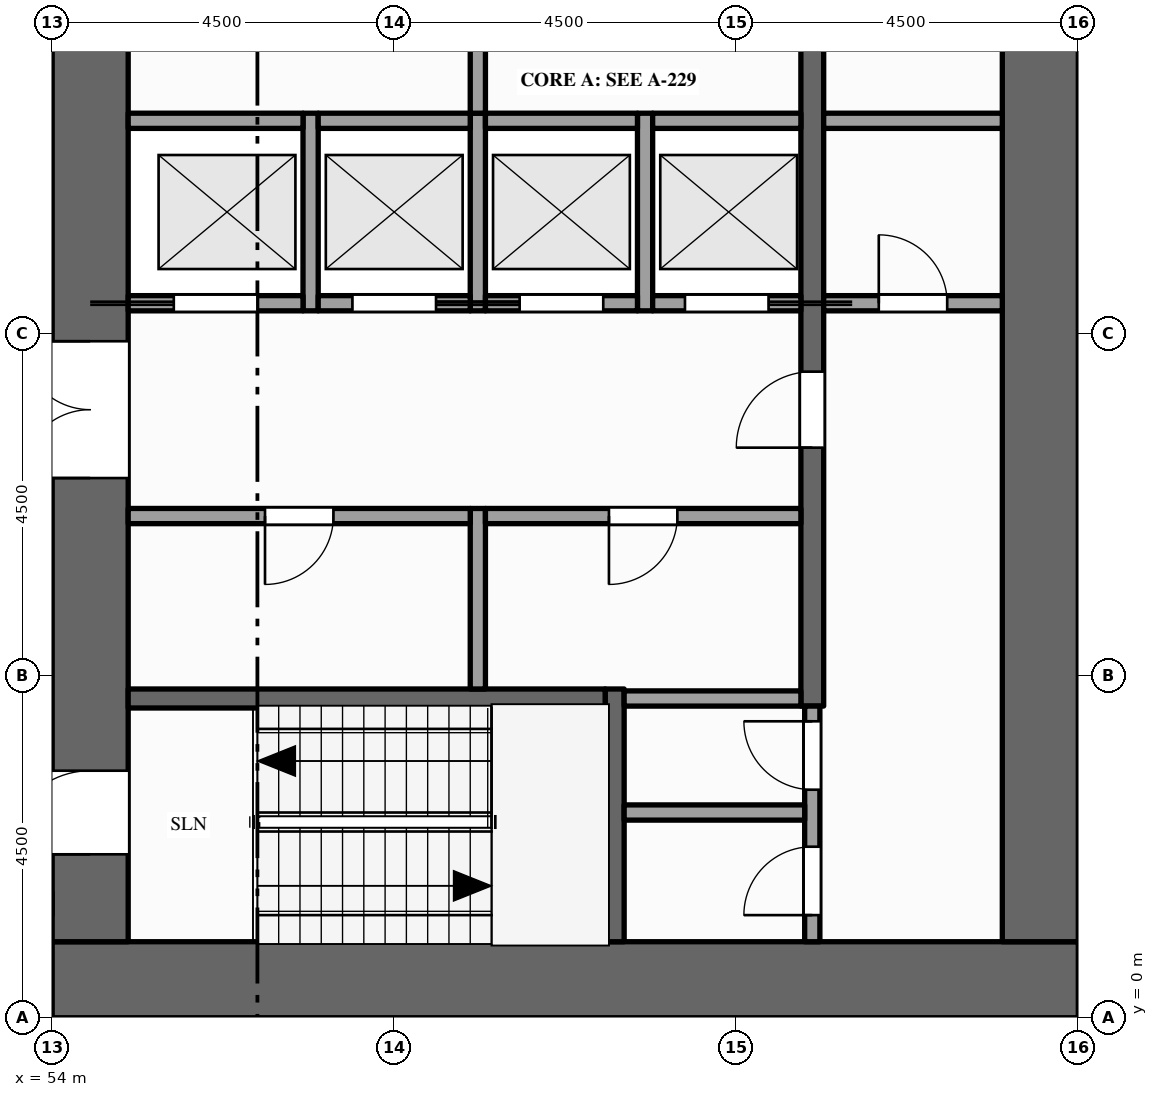
"""IFC4 building model, lengths in metres.
Left out: names, types, materials, properties, quantities, classifications, styles, units other than length and angle.
Written with IfcOpenShell. Run it as: python <this file> out.ifc"""

import sys

from ifc_helpers import new_model, si_unit, direction, frame, frame_2d, origin, place, context, subcontext, project, spatial, rectangle, extrude, element, fill, save


model = new_model("IFC4")
c1 = context("Model", 3, precision=1e-05, world=origin(), true_north=direction((0.0, 1.0)))
c2 = subcontext(c1, "Body", "Model", "MODEL_VIEW")
j1 = project(units=[si_unit("LENGTHUNIT", "METRE"), si_unit("PLANEANGLEUNIT", "RADIAN")], contexts=[c1])
p1 = place(None, origin())
s1 = spatial("IfcSite", under=j1, at=p1, CompositionType="ELEMENT")
p2 = place(p1, origin())
s2 = spatial("IfcBuilding", under=s1, at=p2, CompositionType="ELEMENT")
p3 = place(p2, frame((0.0, 0.0, 155.0)))
s3 = spatial("IfcBuildingStorey", under=s2, at=p3, CompositionType="ELEMENT", Elevation=155.0)
p4 = place(p3, frame((67.5, 0.5, -0.15), z_axis=(0.0, 0.0, 1.0), x_axis=(-1.0, 0.0, 0.0)))
e1 = element("IfcWall", 1, at=p4, inside=s3, PredefinedType="SHEAR", context=c2, shape_type="SweptSolid", body=[
    extrude(rectangle(XDim=13.5, YDim=1.0, at=frame_2d((6.75, 0.0))), origin(), (0.0, 0.0, 1.0), 4.0),
])
p5 = place(p3, frame((54.5, 1.0, -0.15), z_axis=(0.0, 0.0, 1.0), x_axis=(0.0, 1.0, 0.0)))
e2 = element("IfcWall", 2, at=p5, inside=s3, PredefinedType="SHEAR", context=c2, shape_type="SweptSolid", body=[
    extrude(rectangle(XDim=20.5, YDim=1.0, at=frame_2d((10.25, 0.0))), origin(), (0.0, 0.0, 1.0), 4.0),
])
p6 = place(p5, frame((6.1, 0.0, 0.15)))
e3 = element("IfcOpeningElement", 3, at=p6, cuts=e2, PredefinedType="OPENING", context=c2, shape_type="SweptSolid", body=[
    extrude(rectangle(XDim=1.8, YDim=2.1, at=frame_2d((0.9, 1.05))), frame((0.0, 0.51, 0.0), z_axis=(0.0, -1.0, 0.0), x_axis=(1.0, 0.0, 0.0)), (0.0, 0.0, 1.0), 1.02),
])
p7 = place(p5, frame((12.15, 0.0, 0.15)))
e4 = element("IfcOpeningElement", 4, at=p7, cuts=e2, PredefinedType="OPENING", context=c2, shape_type="SweptSolid", body=[
    extrude(rectangle(XDim=1.1, YDim=2.1, at=frame_2d((0.55, 1.05))), frame((0.0, 0.51, 0.0), z_axis=(0.0, -1.0, 0.0), x_axis=(1.0, 0.0, 0.0)), (0.0, 0.0, 1.0), 1.02),
])
p8 = place(p5, frame((1.15, 0.0, 0.15)))
e5 = element("IfcOpeningElement", 5, at=p8, cuts=e2, PredefinedType="OPENING", context=c2, shape_type="SweptSolid", body=[
    extrude(rectangle(XDim=1.1, YDim=2.1, at=frame_2d((0.55, 1.05))), frame((0.0, 0.51, 0.0), z_axis=(0.0, -1.0, 0.0), x_axis=(1.0, 0.0, 0.0)), (0.0, 0.0, 1.0), 1.02),
])
p9 = place(p5, frame((18.35, 0.0, 0.15)))
e6 = element("IfcOpeningElement", 6, at=p9, cuts=e2, PredefinedType="OPENING", context=c2, shape_type="SweptSolid", body=[
    extrude(rectangle(XDim=1.1, YDim=2.1, at=frame_2d((0.55, 1.05))), frame((0.0, 0.51, 0.0), z_axis=(0.0, -1.0, 0.0), x_axis=(1.0, 0.0, 0.0)), (0.0, 0.0, 1.0), 1.02),
])
p10 = place(p3, frame((67.0, 1.0, -0.15), z_axis=(0.0, 0.0, 1.0), x_axis=(0.0, 1.0, 0.0)))
e7 = element("IfcWall", 7, at=p10, inside=s3, PredefinedType="SHEAR", context=c2, shape_type="SweptSolid", body=[
    extrude(rectangle(XDim=20.5, YDim=1.0, at=frame_2d((10.25, 0.0))), origin(), (0.0, 0.0, 1.0), 4.0),
])
p11 = place(p3, frame((57.4, 9.3, 0.0), z_axis=(0.0, 0.0, 1.0), x_axis=(0.0, 1.0, 0.0)))
e8 = element("IfcWall", 8, at=p11, inside=s3, PredefinedType="SOLIDWALL", context=c2, shape_type="SweptSolid", body=[
    extrude(rectangle(XDim=2.6, YDim=0.2, at=frame_2d((1.3, 0.0))), origin(), (0.0, 0.0, 1.0), 3.85),
])
p12 = place(p3, frame((59.6, 4.325, 0.0), z_axis=(0.0, 0.0, 1.0), x_axis=(0.0, 1.0, 0.0)))
e9 = element("IfcWall", 9, at=p12, inside=s3, PredefinedType="PARTITIONING", context=c2, shape_type="SweptSolid", body=[
    extrude(rectangle(XDim=2.375, YDim=0.2, at=frame_2d((1.188, 0.0))), origin(), (0.0, 0.0, 1.0), 3.85),
])
p13 = place(p3, frame((59.6, 9.3, 0.0), z_axis=(0.0, 0.0, 1.0), x_axis=(0.0, 1.0, 0.0)))
e10 = element("IfcWall", 10, at=p13, inside=s3, PredefinedType="SOLIDWALL", context=c2, shape_type="SweptSolid", body=[
    extrude(rectangle(XDim=2.6, YDim=0.2, at=frame_2d((1.3, 0.0))), origin(), (0.0, 0.0, 1.0), 3.85),
])
p14 = place(p3, frame((59.6, 11.9, 0.0), z_axis=(0.0, 0.0, 1.0), x_axis=(0.0, 1.0, 0.0)))
e11 = element("IfcWall", 11, at=p14, inside=s3, PredefinedType="PARTITIONING", context=c2, shape_type="SweptSolid", body=[
    extrude(rectangle(XDim=3.6, YDim=0.2, at=frame_2d((1.8, 0.0))), origin(), (0.0, 0.0, 1.0), 3.85),
])
p15 = place(p14, frame((1.3, 0.0, 0.0)))
e12 = element("IfcOpeningElement", 12, at=p15, cuts=e11, PredefinedType="OPENING", context=c2, shape_type="SweptSolid", body=[
    extrude(rectangle(XDim=1.0, YDim=2.1, at=frame_2d((0.5, 1.05))), frame((0.0, 0.11, 0.0), z_axis=(0.0, -1.0, 0.0), x_axis=(1.0, 0.0, 0.0)), (0.0, 0.0, 1.0), 0.22),
])
p16 = place(p3, frame((61.4, 1.0, 0.0), z_axis=(0.0, 0.0, 1.0), x_axis=(0.0, 1.0, 0.0)))
e13 = element("IfcWall", 13, at=p16, inside=s3, PredefinedType="SHEAR", context=c2, shape_type="SweptSolid", body=[
    extrude(rectangle(XDim=3.325, YDim=0.25, at=frame_2d((1.663, 0.0))), origin(), (0.0, 0.0, 1.0), 3.85),
])
p17 = place(p3, frame((61.8, 9.3, 0.0), z_axis=(0.0, 0.0, 1.0), x_axis=(0.0, 1.0, 0.0)))
e14 = element("IfcWall", 14, at=p17, inside=s3, PredefinedType="SOLIDWALL", context=c2, shape_type="SweptSolid", body=[
    extrude(rectangle(XDim=2.6, YDim=0.2, at=frame_2d((1.3, 0.0))), origin(), (0.0, 0.0, 1.0), 3.85),
])
p18 = place(p3, frame((64.0, 1.0, 0.0), z_axis=(0.0, 0.0, 1.0), x_axis=(0.0, 1.0, 0.0)))
e15 = element("IfcWall", 15, at=p18, inside=s3, PredefinedType="PARTITIONING", context=c2, shape_type="SweptSolid", body=[
    extrude(rectangle(XDim=3.1, YDim=0.2, at=frame_2d((1.55, 0.0))), origin(), (0.0, 0.0, 1.0), 3.85),
])
p19 = place(p18, frame((0.35, 0.0, 0.0)))
e16 = element("IfcOpeningElement", 16, at=p19, cuts=e15, PredefinedType="OPENING", context=c2, shape_type="SweptSolid", body=[
    extrude(rectangle(XDim=0.9, YDim=2.1, at=frame_2d((0.45, 1.05))), frame((0.0, 0.11, 0.0), z_axis=(0.0, -1.0, 0.0), x_axis=(1.0, 0.0, 0.0)), (0.0, 0.0, 1.0), 0.22),
])
p20 = place(p18, frame((2.0, 0.0, 0.0)))
e17 = element("IfcOpeningElement", 17, at=p20, cuts=e15, PredefinedType="OPENING", context=c2, shape_type="SweptSolid", body=[
    extrude(rectangle(XDim=0.9, YDim=2.1, at=frame_2d((0.45, 1.05))), frame((0.0, 0.11, 0.0), z_axis=(0.0, -1.0, 0.0), x_axis=(1.0, 0.0, 0.0)), (0.0, 0.0, 1.0), 0.22),
])
p21 = place(p3, frame((64.0, 4.1, 0.0), z_axis=(0.0, 0.0, 1.0), x_axis=(0.0, 1.0, 0.0)))
e18 = element("IfcWall", 18, at=p21, inside=s3, PredefinedType="SHEAR", context=c2, shape_type="SweptSolid", body=[
    extrude(rectangle(XDim=14.5, YDim=0.3, at=frame_2d((7.25, 0.0))), origin(), (0.0, 0.0, 1.0), 3.85),
])
p22 = place(p21, frame((3.4, 0.0, 0.0)))
e19 = element("IfcOpeningElement", 19, at=p22, cuts=e18, PredefinedType="OPENING", context=c2, shape_type="SweptSolid", body=[
    extrude(rectangle(XDim=1.0, YDim=2.1, at=frame_2d((0.5, 1.05))), frame((0.0, 0.16, 0.0), z_axis=(0.0, -1.0, 0.0), x_axis=(1.0, 0.0, 0.0)), (0.0, 0.0, 1.0), 0.32),
])
p23 = place(p21, frame((9.1, 0.0, 0.0)))
e20 = element("IfcOpeningElement", 20, at=p23, cuts=e18, PredefinedType="OPENING", context=c2, shape_type="SweptSolid", body=[
    extrude(rectangle(XDim=1.0, YDim=2.1, at=frame_2d((0.5, 1.05))), frame((0.0, 0.16, 0.0), z_axis=(0.0, -1.0, 0.0), x_axis=(1.0, 0.0, 0.0)), (0.0, 0.0, 1.0), 0.32),
])
p24 = place(p3, frame((61.525, 2.7, 0.0), z_axis=(0.0, 0.0, 1.0), x_axis=(1.0, 0.0, 0.0)))
e21 = element("IfcWall", 21, at=p24, inside=s3, PredefinedType="PARTITIONING", context=c2, shape_type="SweptSolid", body=[
    extrude(rectangle(XDim=2.375, YDim=0.2, at=frame_2d((1.188, 0.0))), origin(), (0.0, 0.0, 1.0), 3.85),
])
p25 = place(p3, frame((55.0, 4.2, 0.0), z_axis=(0.0, 0.0, 1.0), x_axis=(1.0, 0.0, 0.0)))
e22 = element("IfcWall", 22, at=p25, inside=s3, PredefinedType="SHEAR", context=c2, shape_type="SweptSolid", body=[
    extrude(rectangle(XDim=6.275, YDim=0.25, at=frame_2d((3.137, 0.0))), origin(), (0.0, 0.0, 1.0), 3.85),
])
p26 = place(p3, frame((61.525, 4.2, 0.0), z_axis=(0.0, 0.0, 1.0), x_axis=(1.0, 0.0, 0.0)))
e23 = element("IfcWall", 23, at=p26, inside=s3, PredefinedType="PARTITIONING", context=c2, shape_type="SweptSolid", body=[
    extrude(rectangle(XDim=2.325, YDim=0.2, at=frame_2d((1.163, 0.0))), origin(), (0.0, 0.0, 1.0), 3.85),
])
p27 = place(p3, frame((55.0, 6.6, 0.0), z_axis=(0.0, 0.0, 1.0), x_axis=(1.0, 0.0, 0.0)))
e24 = element("IfcWall", 24, at=p27, inside=s3, PredefinedType="PARTITIONING", context=c2, shape_type="SweptSolid", body=[
    extrude(rectangle(XDim=4.5, YDim=0.2, at=frame_2d((2.25, 0.0))), origin(), (0.0, 0.0, 1.0), 3.85),
])
p28 = place(p27, frame((1.8, 0.0, 0.0)))
e25 = element("IfcOpeningElement", 25, at=p28, cuts=e24, PredefinedType="OPENING", context=c2, shape_type="SweptSolid", body=[
    extrude(rectangle(XDim=0.9, YDim=2.1, at=frame_2d((0.45, 1.05))), frame((0.0, 0.11, 0.0), z_axis=(0.0, -1.0, 0.0), x_axis=(1.0, 0.0, 0.0)), (0.0, 0.0, 1.0), 0.22),
])
p29 = place(p3, frame((59.7, 6.6, 0.0), z_axis=(0.0, 0.0, 1.0), x_axis=(1.0, 0.0, 0.0)))
e26 = element("IfcWall", 26, at=p29, inside=s3, PredefinedType="PARTITIONING", context=c2, shape_type="SweptSolid", body=[
    extrude(rectangle(XDim=4.15, YDim=0.2, at=frame_2d((2.075, 0.0))), origin(), (0.0, 0.0, 1.0), 3.85),
])
p30 = place(p29, frame((1.625, 0.0, 0.0)))
e27 = element("IfcOpeningElement", 27, at=p30, cuts=e26, PredefinedType="OPENING", context=c2, shape_type="SweptSolid", body=[
    extrude(rectangle(XDim=0.9, YDim=2.1, at=frame_2d((0.45, 1.05))), frame((0.0, 0.11, 0.0), z_axis=(0.0, -1.0, 0.0), x_axis=(1.0, 0.0, 0.0)), (0.0, 0.0, 1.0), 0.22),
])
p31 = place(p3, frame((55.0, 9.4, 0.0), z_axis=(0.0, 0.0, 1.0), x_axis=(1.0, 0.0, 0.0)))
e28 = element("IfcWall", 28, at=p31, inside=s3, PredefinedType="SOLIDWALL", context=c2, shape_type="SweptSolid", body=[
    extrude(rectangle(XDim=2.3, YDim=0.2, at=frame_2d((1.15, 0.0))), origin(), (0.0, 0.0, 1.0), 3.85),
])
p32 = place(p31, frame((0.6, 0.0, 0.012)))
e29 = element("IfcOpeningElement", 29, at=p32, cuts=e28, PredefinedType="OPENING", context=c2, shape_type="SweptSolid", body=[
    extrude(rectangle(XDim=1.1, YDim=2.1, at=frame_2d((0.55, 1.05))), frame((0.0, 0.11, 0.0), z_axis=(0.0, -1.0, 0.0), x_axis=(1.0, 0.0, 0.0)), (0.0, 0.0, 1.0), 0.22),
])
p33 = place(p3, frame((57.5, 9.4, 0.0), z_axis=(0.0, 0.0, 1.0), x_axis=(1.0, 0.0, 0.0)))
e30 = element("IfcWall", 30, at=p33, inside=s3, PredefinedType="SOLIDWALL", context=c2, shape_type="SweptSolid", body=[
    extrude(rectangle(XDim=2.0, YDim=0.2, at=frame_2d((1.0, 0.0))), origin(), (0.0, 0.0, 1.0), 3.85),
])
p34 = place(p33, frame((0.45, 0.0, 0.012)))
e31 = element("IfcOpeningElement", 31, at=p34, cuts=e30, PredefinedType="OPENING", context=c2, shape_type="SweptSolid", body=[
    extrude(rectangle(XDim=1.1, YDim=2.1, at=frame_2d((0.55, 1.05))), frame((0.0, 0.11, 0.0), z_axis=(0.0, -1.0, 0.0), x_axis=(1.0, 0.0, 0.0)), (0.0, 0.0, 1.0), 0.22),
])
p35 = place(p3, frame((59.7, 9.4, 0.0), z_axis=(0.0, 0.0, 1.0), x_axis=(1.0, 0.0, 0.0)))
e32 = element("IfcWall", 32, at=p35, inside=s3, PredefinedType="SOLIDWALL", context=c2, shape_type="SweptSolid", body=[
    extrude(rectangle(XDim=2.0, YDim=0.2, at=frame_2d((1.0, 0.0))), origin(), (0.0, 0.0, 1.0), 3.85),
])
p36 = place(p35, frame((0.45, 0.0, 0.012)))
e33 = element("IfcOpeningElement", 33, at=p36, cuts=e32, PredefinedType="OPENING", context=c2, shape_type="SweptSolid", body=[
    extrude(rectangle(XDim=1.1, YDim=2.1, at=frame_2d((0.55, 1.05))), frame((0.0, 0.11, 0.0), z_axis=(0.0, -1.0, 0.0), x_axis=(1.0, 0.0, 0.0)), (0.0, 0.0, 1.0), 0.22),
])
p37 = place(p3, frame((61.9, 9.4, 0.0), z_axis=(0.0, 0.0, 1.0), x_axis=(1.0, 0.0, 0.0)))
e34 = element("IfcWall", 34, at=p37, inside=s3, PredefinedType="SOLIDWALL", context=c2, shape_type="SweptSolid", body=[
    extrude(rectangle(XDim=1.95, YDim=0.2, at=frame_2d((0.975, 0.0))), origin(), (0.0, 0.0, 1.0), 3.85),
])
p38 = place(p37, frame((0.425, 0.0, 0.012)))
e35 = element("IfcOpeningElement", 35, at=p38, cuts=e34, PredefinedType="OPENING", context=c2, shape_type="SweptSolid", body=[
    extrude(rectangle(XDim=1.1, YDim=2.1, at=frame_2d((0.55, 1.05))), frame((0.0, 0.11, 0.0), z_axis=(0.0, -1.0, 0.0), x_axis=(1.0, 0.0, 0.0)), (0.0, 0.0, 1.0), 0.22),
])
p39 = place(p3, frame((64.15, 9.4, 0.0), z_axis=(0.0, 0.0, 1.0), x_axis=(1.0, 0.0, 0.0)))
e36 = element("IfcWall", 36, at=p39, inside=s3, PredefinedType="PARTITIONING", context=c2, shape_type="SweptSolid", body=[
    extrude(rectangle(XDim=2.35, YDim=0.2, at=frame_2d((1.175, 0.0))), origin(), (0.0, 0.0, 1.0), 3.85),
])
p40 = place(p39, frame((0.725, 0.0, 0.0)))
e37 = element("IfcOpeningElement", 37, at=p40, cuts=e36, PredefinedType="OPENING", context=c2, shape_type="SweptSolid", body=[
    extrude(rectangle(XDim=0.9, YDim=2.1, at=frame_2d((0.45, 1.05))), frame((0.0, 0.11, 0.0), z_axis=(0.0, -1.0, 0.0), x_axis=(1.0, 0.0, 0.0)), (0.0, 0.0, 1.0), 0.22),
])
p41 = place(p3, frame((55.0, 11.8, 0.0), z_axis=(0.0, 0.0, 1.0), x_axis=(1.0, 0.0, 0.0)))
e38 = element("IfcWall", 38, at=p41, inside=s3, PredefinedType="SOLIDWALL", context=c2, shape_type="SweptSolid", body=[
    extrude(rectangle(XDim=2.3, YDim=0.2, at=frame_2d((1.15, 0.0))), origin(), (0.0, 0.0, 1.0), 3.85),
])
for number, where, z_axis, x_axis in (
    (39, (57.5, 11.8, 0.0), (0.0, 0.0, 1.0), (1.0, 0.0, 0.0)),
    (40, (59.7, 11.8, 0.0), (0.0, 0.0, 1.0), (1.0, 0.0, 0.0)),
):
    element("IfcWall", number, at=place(p3, frame(where, z_axis=z_axis, x_axis=x_axis)), inside=s3, PredefinedType="SOLIDWALL", context=c2, shape_type="SweptSolid", body=[
        extrude(rectangle(XDim=2.0, YDim=0.2, at=frame_2d((1.0, 0.0))), origin(), (0.0, 0.0, 1.0), 3.85),
    ])
p42 = place(p3, frame((61.9, 11.8, 0.0), z_axis=(0.0, 0.0, 1.0), x_axis=(1.0, 0.0, 0.0)))
e41 = element("IfcWall", 41, at=p42, inside=s3, PredefinedType="SOLIDWALL", context=c2, shape_type="SweptSolid", body=[
    extrude(rectangle(XDim=1.95, YDim=0.2, at=frame_2d((0.975, 0.0))), origin(), (0.0, 0.0, 1.0), 3.85),
])
p43 = place(p3, frame((64.15, 11.8, 0.0), z_axis=(0.0, 0.0, 1.0), x_axis=(1.0, 0.0, 0.0)))
e42 = element("IfcWall", 42, at=p43, inside=s3, PredefinedType="PARTITIONING", context=c2, shape_type="SweptSolid", body=[
    extrude(rectangle(XDim=2.35, YDim=0.2, at=frame_2d((1.175, 0.0))), origin(), (0.0, 0.0, 1.0), 3.85),
])
p44 = place(p32, origin())
e43 = element("IfcDoor", 43, at=p44, inside=s3, OperationType="SLIDING_TO_LEFT", PredefinedType="DOOR", context=c2, shape_type="SweptSolid", body=[
    extrude(rectangle(XDim=1.1, YDim=2.1, at=frame_2d((0.55, 1.05))), frame((0.0, 0.025, 0.0), z_axis=(0.0, -1.0, 0.0), x_axis=(1.0, 0.0, 0.0)), (0.0, 0.0, 1.0), 0.05),
])
fill(e29, e43)
p45 = place(p34, origin())
e44 = element("IfcDoor", 44, at=p45, inside=s3, OperationType="SLIDING_TO_RIGHT", PredefinedType="DOOR", context=c2, shape_type="SweptSolid", body=[
    extrude(rectangle(XDim=1.1, YDim=2.1, at=frame_2d((0.55, 1.05))), frame((0.0, 0.025, 0.0), z_axis=(0.0, -1.0, 0.0), x_axis=(1.0, 0.0, 0.0)), (0.0, 0.0, 1.0), 0.05),
])
fill(e31, e44)
p46 = place(p36, origin())
e45 = element("IfcDoor", 45, at=p46, inside=s3, OperationType="SLIDING_TO_LEFT", PredefinedType="DOOR", context=c2, shape_type="SweptSolid", body=[
    extrude(rectangle(XDim=1.1, YDim=2.1, at=frame_2d((0.55, 1.05))), frame((0.0, 0.025, 0.0), z_axis=(0.0, -1.0, 0.0), x_axis=(1.0, 0.0, 0.0)), (0.0, 0.0, 1.0), 0.05),
])
fill(e33, e45)
p47 = place(p38, origin())
e46 = element("IfcDoor", 46, at=p47, inside=s3, OperationType="SLIDING_TO_RIGHT", PredefinedType="DOOR", context=c2, shape_type="SweptSolid", body=[
    extrude(rectangle(XDim=1.1, YDim=2.1, at=frame_2d((0.55, 1.05))), frame((0.0, 0.025, 0.0), z_axis=(0.0, -1.0, 0.0), x_axis=(1.0, 0.0, 0.0)), (0.0, 0.0, 1.0), 0.05),
])
fill(e35, e46)
p48 = place(p6, origin())
e47 = element("IfcDoor", 47, at=p48, inside=s3, OperationType="DOUBLE_DOOR_SINGLE_SWING", PredefinedType="DOOR", context=c2, shape_type="SweptSolid", body=[
    extrude(rectangle(XDim=1.8, YDim=2.1, at=frame_2d((0.9, 1.05))), frame((0.0, 0.025, 0.0), z_axis=(0.0, -1.0, 0.0), x_axis=(1.0, 0.0, 0.0)), (0.0, 0.0, 1.0), 0.05),
])
fill(e3, e47)
p49 = place(p22, origin())
e48 = element("IfcDoor", 48, at=p49, inside=s3, OperationType="SINGLE_SWING_LEFT", PredefinedType="DOOR", context=c2, shape_type="SweptSolid", body=[
    extrude(rectangle(XDim=1.0, YDim=2.1, at=frame_2d((0.5, 1.05))), frame((0.0, 0.025, 0.0), z_axis=(0.0, -1.0, 0.0), x_axis=(1.0, 0.0, 0.0)), (0.0, 0.0, 1.0), 0.05),
])
fill(e19, e48)
p50 = place(p40, origin())
e49 = element("IfcDoor", 49, at=p50, inside=s3, OperationType="SINGLE_SWING_LEFT", PredefinedType="DOOR", context=c2, shape_type="SweptSolid", body=[
    extrude(rectangle(XDim=0.9, YDim=2.1, at=frame_2d((0.45, 1.05))), frame((0.0, 0.025, 0.0), z_axis=(0.0, -1.0, 0.0), x_axis=(1.0, 0.0, 0.0)), (0.0, 0.0, 1.0), 0.05),
])
fill(e37, e49)
p51 = place(p8, origin())
e50 = element("IfcDoor", 50, at=p51, inside=s3, OperationType="SINGLE_SWING_LEFT", PredefinedType="DOOR", context=c2, shape_type="SweptSolid", body=[
    extrude(rectangle(XDim=1.1, YDim=2.1, at=frame_2d((0.55, 1.05))), frame((0.0, 0.025, 0.0), z_axis=(0.0, -1.0, 0.0), x_axis=(1.0, 0.0, 0.0)), (0.0, 0.0, 1.0), 0.05),
])
fill(e5, e50)
p52 = place(p19, origin())
e51 = element("IfcDoor", 51, at=p52, inside=s3, OperationType="SINGLE_SWING_LEFT", PredefinedType="DOOR", context=c2, shape_type="SweptSolid", body=[
    extrude(rectangle(XDim=0.9, YDim=2.1, at=frame_2d((0.45, 1.05))), frame((0.0, 0.025, 0.0), z_axis=(0.0, -1.0, 0.0), x_axis=(1.0, 0.0, 0.0)), (0.0, 0.0, 1.0), 0.05),
])
fill(e16, e51)
p53 = place(p20, origin())
e52 = element("IfcDoor", 52, at=p53, inside=s3, OperationType="SINGLE_SWING_RIGHT", PredefinedType="DOOR", context=c2, shape_type="SweptSolid", body=[
    extrude(rectangle(XDim=0.9, YDim=2.1, at=frame_2d((0.45, 1.05))), frame((0.0, 0.025, 0.0), z_axis=(0.0, -1.0, 0.0), x_axis=(1.0, 0.0, 0.0)), (0.0, 0.0, 1.0), 0.05),
])
fill(e17, e52)
p54 = place(p28, origin())
e53 = element("IfcDoor", 53, at=p54, inside=s3, OperationType="SINGLE_SWING_LEFT", PredefinedType="DOOR", context=c2, shape_type="SweptSolid", body=[
    extrude(rectangle(XDim=0.9, YDim=2.1, at=frame_2d((0.45, 1.05))), frame((0.0, 0.025, 0.0), z_axis=(0.0, -1.0, 0.0), x_axis=(1.0, 0.0, 0.0)), (0.0, 0.0, 1.0), 0.05),
])
fill(e25, e53)
p55 = place(p30, origin())
e54 = element("IfcDoor", 54, at=p55, inside=s3, OperationType="SINGLE_SWING_LEFT", PredefinedType="DOOR", context=c2, shape_type="SweptSolid", body=[
    extrude(rectangle(XDim=0.9, YDim=2.1, at=frame_2d((0.45, 1.05))), frame((0.0, 0.025, 0.0), z_axis=(0.0, -1.0, 0.0), x_axis=(1.0, 0.0, 0.0)), (0.0, 0.0, 1.0), 0.05),
])
fill(e27, e54)
save(model, sys.argv[1])
